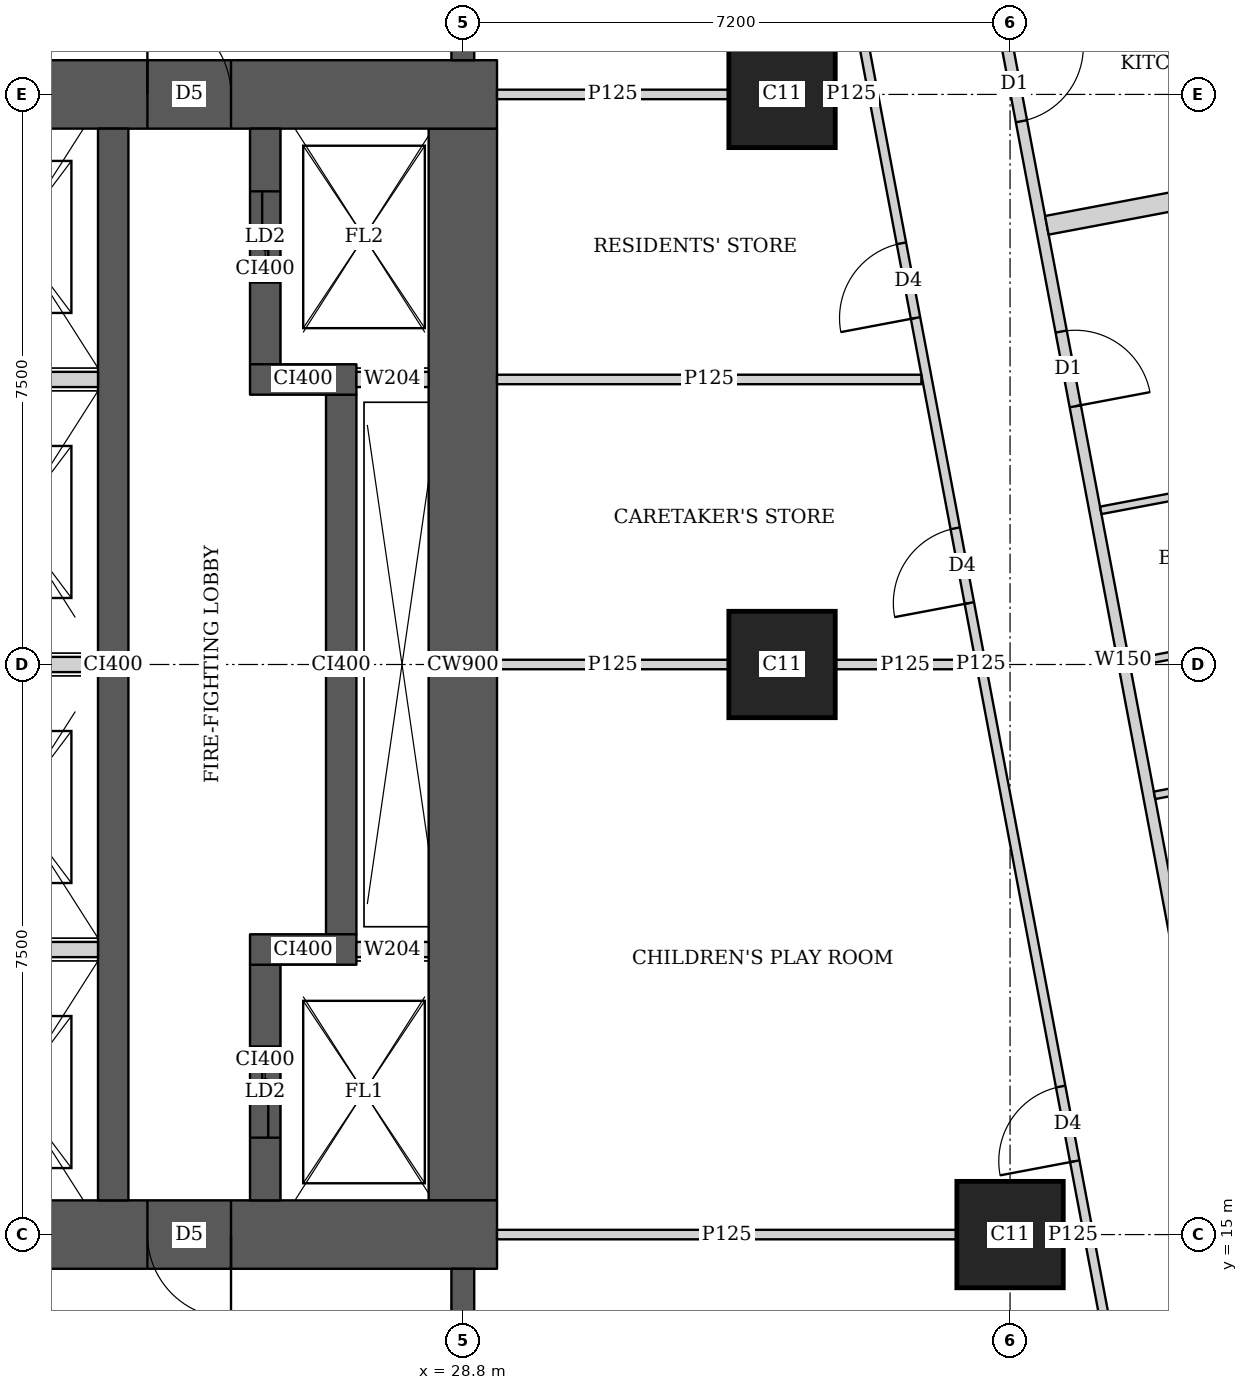
"""IFC4 building model, lengths in metres.
Left out: names, types, materials, properties, quantities, classifications, styles, units other than length and angle.
Written with IfcOpenShell. Run it as: python <this file> out.ifc"""

import sys

from ifc_helpers import new_model, si_unit, direction, frame, frame_2d, origin, origin_2d, place, context, subcontext, project, spatial, rectangle, extrude, element, fill, save


model = new_model("IFC4")
c1 = context("Model", 3, precision=1e-05, world=origin(), true_north=direction((0.0, 1.0)))
c2 = subcontext(c1, "Body", "Model", "MODEL_VIEW")
j1 = project(units=[si_unit("LENGTHUNIT", "METRE"), si_unit("PLANEANGLEUNIT", "RADIAN")], contexts=[c1])
p1 = place(None, origin())
s1 = spatial("IfcSite", under=j1, at=p1, CompositionType="ELEMENT")
p2 = place(p1, origin())
s2 = spatial("IfcBuilding", under=s1, at=p2, CompositionType="ELEMENT")
p3 = place(p2, frame((0.0, 0.0, 204.95)))
s3 = spatial("IfcBuildingStorey", under=s2, at=p3, CompositionType="ELEMENT", Elevation=204.95)
for number, where, z_axis, x_axis in (
    (1, (36.0, 15.0, 0.0), (0.0, 0.0, 1.0), (1.0, 0.0, 0.0)),
    (2, (33.0, 22.5, 0.0), (0.0, 0.0, 1.0), (1.0, 0.0, 0.0)),
    (3, (33.0, 30.0, 0.0), (0.0, 0.0, 1.0), (1.0, 0.0, 0.0)),
):
    element("IfcColumn", number, at=place(p3, frame(where, z_axis=z_axis, x_axis=x_axis)), inside=s3, PredefinedType="COLUMN", context=c2, shape_type="SweptSolid", body=[
        extrude(rectangle(XDim=1.4, YDim=1.4, at=origin_2d()), origin(), (0.0, 0.0, 1.0), 3.75),
    ])
p4 = place(p3, frame((13.95, 15.0, 0.0), z_axis=(0.0, 0.0, 1.0), x_axis=(1.0, 0.0, 0.0)))
e4 = element("IfcWall", 4, at=p4, inside=s3, PredefinedType="SHEAR", context=c2, shape_type="SweptSolid", body=[
    extrude(rectangle(XDim=15.3, YDim=0.9, at=frame_2d((7.65, 0.0))), origin(), (0.0, 0.0, 1.0), 3.75),
])
p5 = place(p4, frame((4.45, 0.0, 0.0)))
e5 = element("IfcOpeningElement", 5, at=p5, cuts=e4, PredefinedType="OPENING", context=c2, shape_type="SweptSolid", body=[
    extrude(rectangle(XDim=1.8, YDim=2.1, at=frame_2d((0.9, 1.05))), frame((0.0, 0.46, 0.0), z_axis=(0.0, -1.0, 0.0), x_axis=(1.0, 0.0, 0.0)), (0.0, 0.0, 1.0), 0.92),
])
p6 = place(p4, frame((10.7, 0.0, 0.0)))
e6 = element("IfcOpeningElement", 6, at=p6, cuts=e4, PredefinedType="OPENING", context=c2, shape_type="SweptSolid", body=[
    extrude(rectangle(XDim=1.1, YDim=2.1, at=frame_2d((0.55, 1.05))), frame((0.0, 0.46, 0.0), z_axis=(0.0, -1.0, 0.0), x_axis=(1.0, 0.0, 0.0)), (0.0, 0.0, 1.0), 0.92),
])
p7 = place(p3, frame((13.95, 30.0, 0.0), z_axis=(0.0, 0.0, 1.0), x_axis=(1.0, 0.0, 0.0)))
e7 = element("IfcWall", 7, at=p7, inside=s3, PredefinedType="SHEAR", context=c2, shape_type="SweptSolid", body=[
    extrude(rectangle(XDim=15.3, YDim=0.9, at=frame_2d((7.65, 0.0))), origin(), (0.0, 0.0, 1.0), 3.75),
])
p8 = place(p7, frame((4.45, 0.0, 0.0)))
e8 = element("IfcOpeningElement", 8, at=p8, cuts=e7, PredefinedType="OPENING", context=c2, shape_type="SweptSolid", body=[
    extrude(rectangle(XDim=1.8, YDim=2.1, at=frame_2d((0.9, 1.05))), frame((0.0, 0.46, 0.0), z_axis=(0.0, -1.0, 0.0), x_axis=(1.0, 0.0, 0.0)), (0.0, 0.0, 1.0), 0.92),
])
p9 = place(p7, frame((10.7, 0.0, 0.0)))
e9 = element("IfcOpeningElement", 9, at=p9, cuts=e7, PredefinedType="OPENING", context=c2, shape_type="SweptSolid", body=[
    extrude(rectangle(XDim=1.1, YDim=2.1, at=frame_2d((0.55, 1.05))), frame((0.0, 0.46, 0.0), z_axis=(0.0, -1.0, 0.0), x_axis=(1.0, 0.0, 0.0)), (0.0, 0.0, 1.0), 0.92),
])
p10 = place(p3, frame((28.8, 15.45, 0.0), z_axis=(0.0, 0.0, 1.0), x_axis=(0.0, 1.0, 0.0)))
e10 = element("IfcWall", 10, at=p10, inside=s3, PredefinedType="SHEAR", context=c2, shape_type="SweptSolid", body=[
    extrude(rectangle(XDim=14.1, YDim=0.9, at=frame_2d((7.05, 0.0))), origin(), (0.0, 0.0, 1.0), 3.75),
])
p11 = place(p3, frame((24.2, 15.45, 0.0), z_axis=(0.0, 0.0, 1.0), x_axis=(0.0, 1.0, 0.0)))
e11 = element("IfcWall", 11, at=p11, inside=s3, PredefinedType="SHEAR", context=c2, shape_type="SweptSolid", body=[
    extrude(rectangle(XDim=14.1, YDim=0.4, at=frame_2d((7.05, 0.0))), origin(), (0.0, 0.0, 1.0), 3.75),
])
p12 = place(p3, frame((26.2, 15.45, 0.0), z_axis=(0.0, 0.0, 1.0), x_axis=(0.0, 1.0, 0.0)))
e12 = element("IfcWall", 12, at=p12, inside=s3, PredefinedType="SHEAR", context=c2, shape_type="SweptSolid", body=[
    extrude(rectangle(XDim=3.1, YDim=0.4, at=frame_2d((1.55, 0.0))), origin(), (0.0, 0.0, 1.0), 3.75),
])
p13 = place(p12, frame((0.825, 0.0, 0.0)))
e13 = element("IfcOpeningElement", 13, at=p13, cuts=e12, PredefinedType="OPENING", context=c2, shape_type="SweptSolid", body=[
    extrude(rectangle(XDim=1.2, YDim=2.1, at=frame_2d((0.6, 1.05))), frame((0.0, 0.21, 0.0), z_axis=(0.0, -1.0, 0.0), x_axis=(1.0, 0.0, 0.0)), (0.0, 0.0, 1.0), 0.42),
])
p14 = place(p3, frame((26.0, 18.75, 0.0), z_axis=(0.0, 0.0, 1.0), x_axis=(1.0, 0.0, 0.0)))
e14 = element("IfcWall", 14, at=p14, inside=s3, PredefinedType="SHEAR", context=c2, shape_type="SweptSolid", body=[
    extrude(rectangle(XDim=1.4, YDim=0.4, at=frame_2d((0.7, 0.0))), origin(), (0.0, 0.0, 1.0), 3.75),
])
p15 = place(p3, frame((27.2, 18.95, 0.0), z_axis=(0.0, 0.0, 1.0), x_axis=(0.0, 1.0, 0.0)))
e15 = element("IfcWall", 15, at=p15, inside=s3, PredefinedType="SHEAR", context=c2, shape_type="SweptSolid", body=[
    extrude(rectangle(XDim=7.1, YDim=0.4, at=frame_2d((3.55, 0.0))), origin(), (0.0, 0.0, 1.0), 3.75),
])
p16 = place(p3, frame((26.0, 26.25, 0.0), z_axis=(0.0, 0.0, 1.0), x_axis=(1.0, 0.0, 0.0)))
e16 = element("IfcWall", 16, at=p16, inside=s3, PredefinedType="SHEAR", context=c2, shape_type="SweptSolid", body=[
    extrude(rectangle(XDim=1.4, YDim=0.4, at=frame_2d((0.7, 0.0))), origin(), (0.0, 0.0, 1.0), 3.75),
])
p17 = place(p3, frame((26.2, 26.45, 0.0), z_axis=(0.0, 0.0, 1.0), x_axis=(0.0, 1.0, 0.0)))
e17 = element("IfcWall", 17, at=p17, inside=s3, PredefinedType="SHEAR", context=c2, shape_type="SweptSolid", body=[
    extrude(rectangle(XDim=3.1, YDim=0.4, at=frame_2d((1.55, 0.0))), origin(), (0.0, 0.0, 1.0), 3.75),
])
p18 = place(p17, frame((1.075, 0.0, 0.0)))
e18 = element("IfcOpeningElement", 18, at=p18, cuts=e17, PredefinedType="OPENING", context=c2, shape_type="SweptSolid", body=[
    extrude(rectangle(XDim=1.2, YDim=2.1, at=frame_2d((0.6, 1.05))), frame((0.0, 0.21, 0.0), z_axis=(0.0, -1.0, 0.0), x_axis=(1.0, 0.0, 0.0)), (0.0, 0.0, 1.0), 0.42),
])
for number, where, z_axis, x_axis in (
    (19, (28.8, 10.35, 0.0), (0.0, 0.0, 1.0), (0.0, 1.0, 0.0)),
    (20, (28.8, 30.45, 0.0), (0.0, 0.0, 1.0), (0.0, 1.0, 0.0)),
):
    element("IfcWall", number, at=place(p3, frame(where, z_axis=z_axis, x_axis=x_axis)), inside=s3, PredefinedType="SHEAR", context=c2, shape_type="SweptSolid", body=[
        extrude(rectangle(XDim=4.2, YDim=0.3, at=frame_2d((2.1, 0.0))), origin(), (0.0, 0.0, 1.0), 3.75),
    ])
p19 = place(p3, frame((33.68, 42.723, 0.0), z_axis=(0.0, 0.0, 1.0), x_axis=(0.185601160014, -0.982625162207, 0.0)))
e21 = element("IfcWall", 21, at=p19, inside=s3, PredefinedType="SOLIDWALL", context=c2, shape_type="SweptSolid", body=[
    extrude(rectangle(XDim=41.051, YDim=0.15, at=frame_2d((20.526, 0.0))), origin(), (0.0, 0.0, 1.0), 2.5),
])
p20 = place(p19, frame((12.307, 0.0, 0.0)))
e22 = element("IfcOpeningElement", 22, at=p20, cuts=e21, PredefinedType="OPENING", context=c2, shape_type="SweptSolid", body=[
    extrude(rectangle(XDim=1.0, YDim=2.1, at=frame_2d((0.5, 1.05))), frame((0.0, 0.085, 0.0), z_axis=(0.0, -1.0, 0.0), x_axis=(1.0, 0.0, 0.0)), (0.0, 0.0, 1.0), 0.17),
])
p21 = place(p19, frame((16.123, 0.0, 0.0)))
e23 = element("IfcOpeningElement", 23, at=p21, cuts=e21, PredefinedType="OPENING", context=c2, shape_type="SweptSolid", body=[
    extrude(rectangle(XDim=1.0, YDim=2.1, at=frame_2d((0.5, 1.05))), frame((0.0, 0.085, 0.0), z_axis=(0.0, -1.0, 0.0), x_axis=(1.0, 0.0, 0.0)), (0.0, 0.0, 1.0), 0.17),
])
p22 = place(p19, frame((30.902, 0.0, 0.0)))
e24 = element("IfcOpeningElement", 24, at=p22, cuts=e21, PredefinedType="OPENING", context=c2, shape_type="SweptSolid", body=[
    extrude(rectangle(XDim=1.0, YDim=2.1, at=frame_2d((0.5, 1.05))), frame((0.0, 0.085, 0.0), z_axis=(0.0, -1.0, 0.0), x_axis=(1.0, 0.0, 0.0)), (0.0, 0.0, 1.0), 0.17),
])
p23 = place(p3, frame((40.657, 25.183, 0.0), z_axis=(0.0, 0.0, 1.0), x_axis=(-0.982585626838, -0.185810349366, 0.0)))
e25 = element("IfcWall", 25, at=p23, inside=s3, PredefinedType="PARTITIONING", context=c2, shape_type="SweptSolid", body=[
    extrude(rectangle(XDim=3.525, YDim=0.1, at=frame_2d((1.763, 0.0))), origin(), (0.0, 0.0, 1.0), 3.5),
])
p24 = place(p3, frame((41.365, 21.433, 0.0), z_axis=(0.0, 0.0, 1.0), x_axis=(-0.982638553676, -0.185530247748, 0.0)))
e26 = element("IfcWall", 26, at=p24, inside=s3, PredefinedType="PARTITIONING", context=c2, shape_type="SweptSolid", body=[
    extrude(rectangle(XDim=3.525, YDim=0.1, at=frame_2d((1.763, 0.0))), origin(), (0.0, 0.0, 1.0), 3.5),
])
p25 = place(p3, frame((41.037, 23.168, 0.0), z_axis=(0.0, 0.0, 1.0), x_axis=(-0.982638553676, -0.185530247748, 0.0)))
e27 = element("IfcWall", 27, at=p25, inside=s3, PredefinedType="PARTITIONING", context=c2, shape_type="SweptSolid", body=[
    extrude(rectangle(XDim=3.525, YDim=0.1, at=frame_2d((1.763, 0.0))), origin(), (0.0, 0.0, 1.0), 2.5),
])
p26 = place(p3, frame((41.177, 29.164, 0.0), z_axis=(0.0, 0.0, 1.0), x_axis=(-0.982642846239, -0.185507511263, 0.0)))
e28 = element("IfcWall", 28, at=p26, inside=s3, PredefinedType="SOLIDWALL", context=c2, shape_type="SweptSolid", body=[
    extrude(rectangle(XDim=4.776, YDim=0.25, at=frame_2d((2.388, 0.0))), origin(), (0.0, 0.0, 1.0), 2.5),
])
p27 = place(p3, frame((37.9, 10.413, 0.0), z_axis=(0.0, 0.0, 1.0), x_axis=(-0.185589740669, 0.982627319058, 0.0)))
e29 = element("IfcWall", 29, at=p27, inside=s3, PredefinedType="PARTITIONING", context=c2, shape_type="SweptSolid", body=[
    extrude(rectangle(XDim=24.602, YDim=0.125, at=frame_2d((12.301, 0.0))), origin(), (0.0, 0.0, 1.0), 2.5),
])
p28 = place(p27, frame((0.708, 0.0, 0.0)))
e30 = element("IfcOpeningElement", 30, at=p28, cuts=e29, PredefinedType="OPENING", context=c2, shape_type="SweptSolid", body=[
    extrude(rectangle(XDim=1.0, YDim=2.1, at=frame_2d((0.5, 1.05))), frame((0.0, 0.073, 0.0), z_axis=(0.0, -1.0, 0.0), x_axis=(1.0, 0.0, 0.0)), (0.0, 0.0, 1.0), 0.145),
])
p29 = place(p27, frame((5.65, 0.0, 0.0)))
e31 = element("IfcOpeningElement", 31, at=p29, cuts=e29, PredefinedType="OPENING", context=c2, shape_type="SweptSolid", body=[
    extrude(rectangle(XDim=1.0, YDim=2.1, at=frame_2d((0.5, 1.05))), frame((0.0, 0.073, 0.0), z_axis=(0.0, -1.0, 0.0), x_axis=(1.0, 0.0, 0.0)), (0.0, 0.0, 1.0), 0.145),
])
p30 = place(p27, frame((13.124, 0.0, 0.0)))
e32 = element("IfcOpeningElement", 32, at=p30, cuts=e29, PredefinedType="OPENING", context=c2, shape_type="SweptSolid", body=[
    extrude(rectangle(XDim=1.0, YDim=2.1, at=frame_2d((0.5, 1.05))), frame((0.0, 0.073, 0.0), z_axis=(0.0, -1.0, 0.0), x_axis=(1.0, 0.0, 0.0)), (0.0, 0.0, 1.0), 0.145),
])
p31 = place(p27, frame((16.94, 0.0, 0.0)))
e33 = element("IfcOpeningElement", 33, at=p31, cuts=e29, PredefinedType="OPENING", context=c2, shape_type="SweptSolid", body=[
    extrude(rectangle(XDim=1.0, YDim=2.1, at=frame_2d((0.5, 1.05))), frame((0.0, 0.073, 0.0), z_axis=(0.0, -1.0, 0.0), x_axis=(1.0, 0.0, 0.0)), (0.0, 0.0, 1.0), 0.145),
])
p32 = place(p27, frame((20.9, 0.0, 0.0)))
e34 = element("IfcOpeningElement", 34, at=p32, cuts=e29, PredefinedType="OPENING", context=c2, shape_type="SweptSolid", body=[
    extrude(rectangle(XDim=1.0, YDim=2.1, at=frame_2d((0.5, 1.05))), frame((0.0, 0.073, 0.0), z_axis=(0.0, -1.0, 0.0), x_axis=(1.0, 0.0, 0.0)), (0.0, 0.0, 1.0), 0.145),
])
p33 = place(p3, frame((29.25, 15.0, 0.0), z_axis=(0.0, 0.0, 1.0), x_axis=(1.0, 0.0, 0.0)))
e35 = element("IfcWall", 35, at=p33, inside=s3, PredefinedType="PARTITIONING", context=c2, shape_type="SweptSolid", body=[
    extrude(rectangle(XDim=6.049, YDim=0.125, at=frame_2d((3.024, 0.0))), origin(), (0.0, 0.0, 1.0), 3.5),
])
p34 = place(p3, frame((36.701, 15.0, 0.0), z_axis=(0.0, 0.0, 1.0), x_axis=(1.0, 0.0, 0.0)))
e36 = element("IfcWall", 36, at=p34, inside=s3, PredefinedType="PARTITIONING", context=c2, shape_type="SweptSolid", body=[
    extrude(rectangle(XDim=0.257, YDim=0.125, at=frame_2d((0.128, 0.0))), origin(), (0.0, 0.0, 1.0), 3.5),
])
p35 = place(p3, frame((29.25, 22.5, 0.0), z_axis=(0.0, 0.0, 1.0), x_axis=(1.0, 0.0, 0.0)))
e37 = element("IfcWall", 37, at=p35, inside=s3, PredefinedType="PARTITIONING", context=c2, shape_type="SweptSolid", body=[
    extrude(rectangle(XDim=3.049, YDim=0.125, at=frame_2d((1.524, 0.0))), origin(), (0.0, 0.0, 1.0), 3.5),
])
p36 = place(p3, frame((33.701, 22.5, 0.0), z_axis=(0.0, 0.0, 1.0), x_axis=(1.0, 0.0, 0.0)))
e38 = element("IfcWall", 38, at=p36, inside=s3, PredefinedType="PARTITIONING", context=c2, shape_type="SweptSolid", body=[
    extrude(rectangle(XDim=1.841, YDim=0.125, at=frame_2d((0.92, 0.0))), origin(), (0.0, 0.0, 1.0), 2.5),
])
p37 = place(p3, frame((29.25, 26.25, 0.0), z_axis=(0.0, 0.0, 1.0), x_axis=(1.0, 0.0, 0.0)))
e39 = element("IfcWall", 39, at=p37, inside=s3, PredefinedType="PARTITIONING", context=c2, shape_type="SweptSolid", body=[
    extrude(rectangle(XDim=5.583, YDim=0.125, at=frame_2d((2.792, 0.0))), origin(), (0.0, 0.0, 1.0), 3.5),
])
p38 = place(p3, frame((29.25, 30.0, 0.0), z_axis=(0.0, 0.0, 1.0), x_axis=(1.0, 0.0, 0.0)))
e40 = element("IfcWall", 40, at=p38, inside=s3, PredefinedType="PARTITIONING", context=c2, shape_type="SweptSolid", body=[
    extrude(rectangle(XDim=3.049, YDim=0.125, at=frame_2d((1.524, 0.0))), origin(), (0.0, 0.0, 1.0), 3.5),
])
p39 = place(p3, frame((33.701, 30.0, 0.0), z_axis=(0.0, 0.0, 1.0), x_axis=(1.0, 0.0, 0.0)))
e41 = element("IfcWall", 41, at=p39, inside=s3, PredefinedType="PARTITIONING", context=c2, shape_type="SweptSolid", body=[
    extrude(rectangle(XDim=0.424, YDim=0.125, at=frame_2d((0.212, 0.0))), origin(), (0.0, 0.0, 1.0), 2.5),
])
for number, where, z_axis, x_axis in (
    (42, (21.8, 18.75, 0.0), (0.0, 0.0, 1.0), (1.0, 0.0, 0.0)),
    (43, (21.8, 22.5, 0.0), (0.0, 0.0, 1.0), (1.0, 0.0, 0.0)),
    (44, (21.8, 26.25, 0.0), (0.0, 0.0, 1.0), (1.0, 0.0, 0.0)),
):
    element("IfcWall", number, at=place(p3, frame(where, z_axis=z_axis, x_axis=x_axis)), inside=s3, PredefinedType="SOLIDWALL", context=c2, shape_type="SweptSolid", body=[
        extrude(rectangle(XDim=2.2, YDim=0.2, at=frame_2d((1.1, 0.0))), origin(), (0.0, 0.0, 1.0), 3.5),
    ])
for number, where, z_axis, x_axis in (
    (45, (27.4, 18.75, 0.0), (0.0, 0.0, 1.0), (1.0, 0.0, 0.0)),
    (46, (27.4, 26.25, 0.0), (0.0, 0.0, 1.0), (1.0, 0.0, 0.0)),
):
    element("IfcWall", number, at=place(p3, frame(where, z_axis=z_axis, x_axis=x_axis)), inside=s3, PredefinedType="SOLIDWALL", context=c2, shape_type="SweptSolid", body=[
        extrude(rectangle(XDim=0.95, YDim=0.2, at=frame_2d((0.475, 0.0))), origin(), (0.0, 0.0, 1.0), 3.5),
    ])
p40 = place(p20, origin())
e47 = element("IfcDoor", 47, at=p40, inside=s3, OperationType="SINGLE_SWING_LEFT", PredefinedType="DOOR", context=c2, shape_type="SweptSolid", body=[
    extrude(rectangle(XDim=1.0, YDim=2.1, at=frame_2d((0.5, 1.05))), frame((0.0, 0.025, 0.0), z_axis=(0.0, -1.0, 0.0), x_axis=(1.0, 0.0, 0.0)), (0.0, 0.0, 1.0), 0.05),
])
fill(e22, e47)
p41 = place(p21, origin())
e48 = element("IfcDoor", 48, at=p41, inside=s3, OperationType="SINGLE_SWING_RIGHT", PredefinedType="DOOR", context=c2, shape_type="SweptSolid", body=[
    extrude(rectangle(XDim=1.0, YDim=2.1, at=frame_2d((0.5, 1.05))), frame((0.0, 0.025, 0.0), z_axis=(0.0, -1.0, 0.0), x_axis=(1.0, 0.0, 0.0)), (0.0, 0.0, 1.0), 0.05),
])
fill(e23, e48)
p42 = place(p29, origin())
e49 = element("IfcDoor", 49, at=p42, inside=s3, OperationType="SINGLE_SWING_LEFT", PredefinedType="DOOR", context=c2, shape_type="SweptSolid", body=[
    extrude(rectangle(XDim=1.0, YDim=2.1, at=frame_2d((0.5, 1.05))), frame((0.0, 0.025, 0.0), z_axis=(0.0, -1.0, 0.0), x_axis=(1.0, 0.0, 0.0)), (0.0, 0.0, 1.0), 0.05),
])
fill(e31, e49)
p43 = place(p30, origin())
e50 = element("IfcDoor", 50, at=p43, inside=s3, OperationType="SINGLE_SWING_LEFT", PredefinedType="DOOR", context=c2, shape_type="SweptSolid", body=[
    extrude(rectangle(XDim=1.0, YDim=2.1, at=frame_2d((0.5, 1.05))), frame((0.0, 0.025, 0.0), z_axis=(0.0, -1.0, 0.0), x_axis=(1.0, 0.0, 0.0)), (0.0, 0.0, 1.0), 0.05),
])
fill(e32, e50)
p44 = place(p31, origin())
e51 = element("IfcDoor", 51, at=p44, inside=s3, OperationType="SINGLE_SWING_LEFT", PredefinedType="DOOR", context=c2, shape_type="SweptSolid", body=[
    extrude(rectangle(XDim=1.0, YDim=2.1, at=frame_2d((0.5, 1.05))), frame((0.0, 0.025, 0.0), z_axis=(0.0, -1.0, 0.0), x_axis=(1.0, 0.0, 0.0)), (0.0, 0.0, 1.0), 0.05),
])
fill(e33, e51)
p45 = place(p6, origin())
e52 = element("IfcDoor", 52, at=p45, inside=s3, OperationType="SINGLE_SWING_LEFT", PredefinedType="DOOR", context=c2, shape_type="SweptSolid", body=[
    extrude(rectangle(XDim=1.1, YDim=2.1, at=frame_2d((0.55, 1.05))), frame((0.0, 0.025, 0.0), z_axis=(0.0, -1.0, 0.0), x_axis=(1.0, 0.0, 0.0)), (0.0, 0.0, 1.0), 0.05),
])
fill(e6, e52)
p46 = place(p9, origin())
e53 = element("IfcDoor", 53, at=p46, inside=s3, OperationType="SINGLE_SWING_LEFT", PredefinedType="DOOR", context=c2, shape_type="SweptSolid", body=[
    extrude(rectangle(XDim=1.1, YDim=2.1, at=frame_2d((0.55, 1.05))), frame((0.0, 0.025, 0.0), z_axis=(0.0, -1.0, 0.0), x_axis=(1.0, 0.0, 0.0)), (0.0, 0.0, 1.0), 0.05),
])
fill(e9, e53)
p47 = place(p13, origin())
e54 = element("IfcDoor", 54, at=p47, inside=s3, OperationType="DOUBLE_DOOR_SLIDING", PredefinedType="DOOR", context=c2, shape_type="SweptSolid", body=[
    extrude(rectangle(XDim=1.2, YDim=2.1, at=frame_2d((0.6, 1.05))), frame((0.0, 0.025, 0.0), z_axis=(0.0, -1.0, 0.0), x_axis=(1.0, 0.0, 0.0)), (0.0, 0.0, 1.0), 0.05),
])
fill(e13, e54)
p48 = place(p18, origin())
e55 = element("IfcDoor", 55, at=p48, inside=s3, OperationType="DOUBLE_DOOR_SLIDING", PredefinedType="DOOR", context=c2, shape_type="SweptSolid", body=[
    extrude(rectangle(XDim=1.2, YDim=2.1, at=frame_2d((0.6, 1.05))), frame((0.0, 0.025, 0.0), z_axis=(0.0, -1.0, 0.0), x_axis=(1.0, 0.0, 0.0)), (0.0, 0.0, 1.0), 0.05),
])
fill(e18, e55)
save(model, sys.argv[1])
